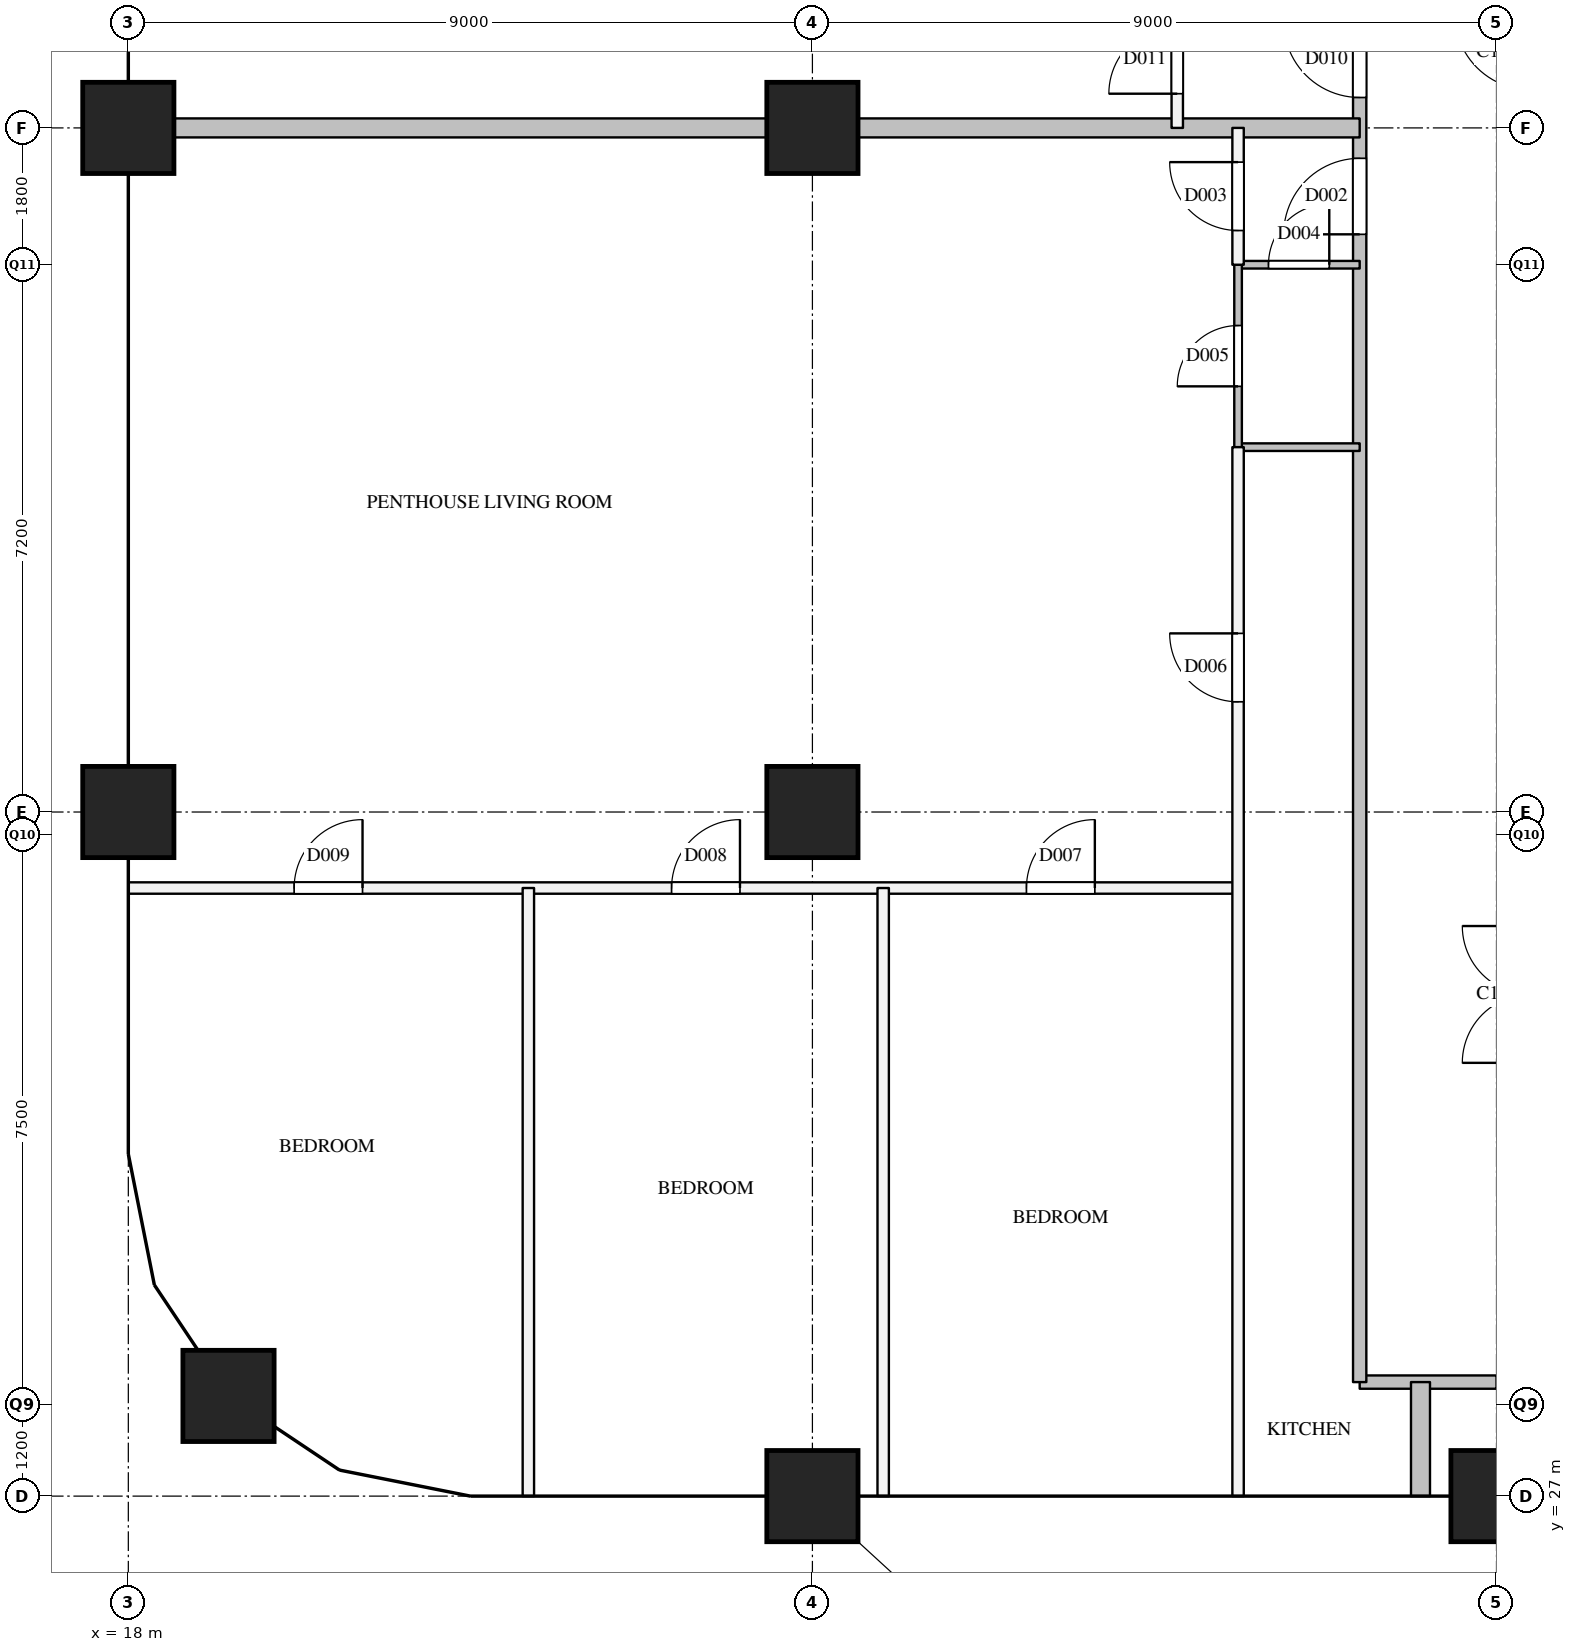
"""IFC4 building model, lengths in metres.
Left out: names, types, materials, properties, quantities, classifications, styles, units other than length and angle.
Written with IfcOpenShell. Run it as: python <this file> out.ifc"""

import sys

from ifc_helpers import new_model, si_unit, direction, frame, frame_2d, origin, origin_2d, place, context, subcontext, project, spatial, rectangle, extrude, element, fill, save


model = new_model("IFC4")
c1 = context("Model", 3, precision=1e-05, world=origin(), true_north=direction((0.0, 1.0)))
c2 = subcontext(c1, "Body", "Model", "MODEL_VIEW")
j1 = project(units=[si_unit("LENGTHUNIT", "METRE"), si_unit("PLANEANGLEUNIT", "RADIAN")], contexts=[c1])
p1 = place(None, origin())
s1 = spatial("IfcSite", under=j1, at=p1, CompositionType="ELEMENT")
p2 = place(p1, origin())
s2 = spatial("IfcBuilding", under=s1, at=p2, CompositionType="ELEMENT")
p3 = place(p2, frame((0.0, 0.0, 301.2)))
s3 = spatial("IfcBuildingStorey", under=s2, at=p3, CompositionType="ELEMENT", Elevation=301.2)
for number, where, z_axis, x_axis in (
    (1, (19.318, 28.318, 0.0), (0.0, 0.0, 1.0), (1.0, 0.0, 0.0)),
    (2, (18.0, 36.0, 0.0), (0.0, 0.0, 1.0), (1.0, 0.0, 0.0)),
    (3, (18.0, 45.0, 0.0), (0.0, 0.0, 1.0), (1.0, 0.0, 0.0)),
    (4, (27.0, 27.0, 0.0), (0.0, 0.0, 1.0), (1.0, 0.0, 0.0)),
    (5, (27.0, 36.0, 0.0), (0.0, 0.0, 1.0), (1.0, 0.0, 0.0)),
    (6, (27.0, 45.0, 0.0), (0.0, 0.0, 1.0), (1.0, 0.0, 0.0)),
    (7, (36.0, 27.0, 0.0), (0.0, 0.0, 1.0), (1.0, 0.0, 0.0)),
):
    element("IfcColumn", number, at=place(p3, frame(where, z_axis=z_axis, x_axis=x_axis)), inside=s3, PredefinedType="COLUMN", context=c2, shape_type="SweptSolid", body=[
        extrude(rectangle(XDim=1.2, YDim=1.2, at=origin_2d()), origin(), (0.0, 0.0, 1.0), 3.9),
    ])
p4 = place(p3, frame((34.2, 28.5, 0.0), z_axis=(0.0, 0.0, 1.0), x_axis=(1.0, 0.0, 0.0)))
e8 = element("IfcWall", 8, at=p4, inside=s3, PredefinedType="PARTITIONING", context=c2, shape_type="SweptSolid", body=[
    extrude(rectangle(XDim=1.8, YDim=0.175, at=frame_2d((0.9, 0.0))), origin(), (0.0, 0.0, 1.0), 3.6),
])
p5 = place(p3, frame((34.2, 28.5, 0.0), z_axis=(0.0, 0.0, 1.0), x_axis=(0.0, 1.0, 0.0)))
e9 = element("IfcWall", 9, at=p5, inside=s3, PredefinedType="PARTITIONING", context=c2, shape_type="SweptSolid", body=[
    extrude(rectangle(XDim=23.3, YDim=0.175, at=frame_2d((11.65, 0.0))), origin(), (0.0, 0.0, 1.0), 3.6),
])
p6 = place(p5, frame((15.1, 0.0, 0.0)))
e10 = element("IfcOpeningElement", 10, at=p6, cuts=e9, PredefinedType="OPENING", context=c2, shape_type="SweptSolid", body=[
    extrude(rectangle(XDim=1.0, YDim=2.1, at=frame_2d((0.5, 1.05))), frame((0.0, 0.097, 0.0), z_axis=(0.0, -1.0, 0.0), x_axis=(1.0, 0.0, 0.0)), (0.0, 0.0, 1.0), 0.195),
])
p7 = place(p5, frame((16.9, 0.0, 0.0)))
e11 = element("IfcOpeningElement", 11, at=p7, cuts=e9, PredefinedType="OPENING", context=c2, shape_type="SweptSolid", body=[
    extrude(rectangle(XDim=1.0, YDim=2.1, at=frame_2d((0.5, 1.05))), frame((0.0, 0.097, 0.0), z_axis=(0.0, -1.0, 0.0), x_axis=(1.0, 0.0, 0.0)), (0.0, 0.0, 1.0), 0.195),
])
p8 = place(p5, frame((21.9, 0.0, 0.0)))
e12 = element("IfcOpeningElement", 12, at=p8, cuts=e9, PredefinedType="OPENING", context=c2, shape_type="SweptSolid", body=[
    extrude(rectangle(XDim=1.0, YDim=2.1, at=frame_2d((0.5, 1.05))), frame((0.0, 0.097, 0.0), z_axis=(0.0, -1.0, 0.0), x_axis=(1.0, 0.0, 0.0)), (0.0, 0.0, 1.0), 0.195),
])
p9 = place(p3, frame((18.0, 35.0, 0.0), z_axis=(0.0, 0.0, 1.0), x_axis=(1.0, 0.0, 0.0)))
e13 = element("IfcWall", 13, at=p9, inside=s3, PredefinedType="PARTITIONING", context=c2, shape_type="SweptSolid", body=[
    extrude(rectangle(XDim=14.6, YDim=0.15, at=frame_2d((7.3, 0.0))), origin(), (0.0, 0.0, 1.0), 2.6),
])
p10 = place(p9, frame((11.816, 0.0, 0.0)))
e14 = element("IfcOpeningElement", 14, at=p10, cuts=e13, PredefinedType="OPENING", context=c2, shape_type="SweptSolid", body=[
    extrude(rectangle(XDim=0.9, YDim=2.1, at=frame_2d((0.45, 1.05))), frame((0.0, 0.085, 0.0), z_axis=(0.0, -1.0, 0.0), x_axis=(1.0, 0.0, 0.0)), (0.0, 0.0, 1.0), 0.17),
])
p11 = place(p9, frame((7.147, 0.0, 0.0)))
e15 = element("IfcOpeningElement", 15, at=p11, cuts=e13, PredefinedType="OPENING", context=c2, shape_type="SweptSolid", body=[
    extrude(rectangle(XDim=0.9, YDim=2.1, at=frame_2d((0.45, 1.05))), frame((0.0, 0.085, 0.0), z_axis=(0.0, -1.0, 0.0), x_axis=(1.0, 0.0, 0.0)), (0.0, 0.0, 1.0), 0.17),
])
p12 = place(p9, frame((2.181, 0.0, 0.0)))
e16 = element("IfcOpeningElement", 16, at=p12, cuts=e13, PredefinedType="OPENING", context=c2, shape_type="SweptSolid", body=[
    extrude(rectangle(XDim=0.9, YDim=2.1, at=frame_2d((0.45, 1.05))), frame((0.0, 0.085, 0.0), z_axis=(0.0, -1.0, 0.0), x_axis=(1.0, 0.0, 0.0)), (0.0, 0.0, 1.0), 0.17),
])
for number, where, z_axis, x_axis in (
    (17, (23.263, 27.0, 0.0), (0.0, 0.0, 1.0), (0.0, 1.0, 0.0)),
    (18, (27.931, 27.0, 0.0), (0.0, 0.0, 1.0), (0.0, 1.0, 0.0)),
):
    element("IfcWall", number, at=place(p3, frame(where, z_axis=z_axis, x_axis=x_axis)), inside=s3, PredefinedType="PARTITIONING", context=c2, shape_type="SweptSolid", body=[
        extrude(rectangle(XDim=8.0, YDim=0.15, at=frame_2d((4.0, 0.0))), origin(), (0.0, 0.0, 1.0), 2.6),
    ])
p13 = place(p3, frame((31.8, 45.0, 0.0), z_axis=(0.0, 0.0, 1.0), x_axis=(0.0, 1.0, 0.0)))
e19 = element("IfcWall", 19, at=p13, inside=s3, PredefinedType="PARTITIONING", context=c2, shape_type="SweptSolid", body=[
    extrude(rectangle(XDim=1.8, YDim=0.15, at=frame_2d((0.9, 0.0))), origin(), (0.0, 0.0, 1.0), 3.6),
])
p14 = place(p13, frame((0.45, 0.0, 0.0)))
e20 = element("IfcOpeningElement", 20, at=p14, cuts=e19, PredefinedType="OPENING", context=c2, shape_type="SweptSolid", body=[
    extrude(rectangle(XDim=0.9, YDim=2.1, at=frame_2d((0.45, 1.05))), frame((0.0, 0.085, 0.0), z_axis=(0.0, -1.0, 0.0), x_axis=(1.0, 0.0, 0.0)), (0.0, 0.0, 1.0), 0.17),
])
p15 = place(p3, frame((32.6, 27.0, 0.0), z_axis=(0.0, 0.0, 1.0), x_axis=(0.0, 1.0, 0.0)))
e21 = element("IfcWall", 21, at=p15, inside=s3, PredefinedType="PARTITIONING", context=c2, shape_type="SweptSolid", body=[
    extrude(rectangle(XDim=13.8, YDim=0.15, at=frame_2d((6.9, 0.0))), origin(), (0.0, 0.0, 1.0), 2.6),
])
p16 = place(p15, frame((10.45, 0.0, 0.0)))
e22 = element("IfcOpeningElement", 22, at=p16, cuts=e21, PredefinedType="OPENING", context=c2, shape_type="SweptSolid", body=[
    extrude(rectangle(XDim=0.9, YDim=2.1, at=frame_2d((0.45, 1.05))), frame((0.0, 0.085, 0.0), z_axis=(0.0, -1.0, 0.0), x_axis=(1.0, 0.0, 0.0)), (0.0, 0.0, 1.0), 0.17),
])
p17 = place(p3, frame((32.6, 43.2, 0.0), z_axis=(0.0, 0.0, 1.0), x_axis=(0.0, 1.0, 0.0)))
e23 = element("IfcWall", 23, at=p17, inside=s3, PredefinedType="PARTITIONING", context=c2, shape_type="SweptSolid", body=[
    extrude(rectangle(XDim=1.8, YDim=0.15, at=frame_2d((0.9, 0.0))), origin(), (0.0, 0.0, 1.0), 3.6),
])
p18 = place(p17, frame((0.45, 0.0, 0.0)))
e24 = element("IfcOpeningElement", 24, at=p18, cuts=e23, PredefinedType="OPENING", context=c2, shape_type="SweptSolid", body=[
    extrude(rectangle(XDim=0.9, YDim=2.1, at=frame_2d((0.45, 1.05))), frame((0.0, 0.085, 0.0), z_axis=(0.0, -1.0, 0.0), x_axis=(1.0, 0.0, 0.0)), (0.0, 0.0, 1.0), 0.17),
])
p19 = place(p3, frame((18.0, 45.0, 0.0), z_axis=(0.0, 0.0, 1.0), x_axis=(1.0, 0.0, 0.0)))
e25 = element("IfcWall", 25, at=p19, inside=s3, PredefinedType="PARTITIONING", context=c2, shape_type="SweptSolid", body=[
    extrude(rectangle(XDim=16.2, YDim=0.25, at=frame_2d((8.1, 0.0))), origin(), (0.0, 0.0, 1.0), 3.6),
])
p20 = place(p3, frame((35.0, 27.0, 0.0), z_axis=(0.0, 0.0, 1.0), x_axis=(0.0, 1.0, 0.0)))
e26 = element("IfcWall", 26, at=p20, inside=s3, PredefinedType="PARTITIONING", context=c2, shape_type="SweptSolid", body=[
    extrude(rectangle(XDim=1.5, YDim=0.25, at=frame_2d((0.75, 0.0))), origin(), (0.0, 0.0, 1.0), 2.6),
])
p21 = place(p3, frame((32.6, 40.8, 0.0), z_axis=(0.0, 0.0, 1.0), x_axis=(1.0, 0.0, 0.0)))
e27 = element("IfcWall", 27, at=p21, inside=s3, PredefinedType="PARTITIONING", context=c2, shape_type="SweptSolid", body=[
    extrude(rectangle(XDim=1.6, YDim=0.1, at=frame_2d((0.8, 0.0))), origin(), (0.0, 0.0, 1.0), 3.6),
])
p22 = place(p3, frame((32.6, 43.2, 0.0), z_axis=(0.0, 0.0, 1.0), x_axis=(1.0, 0.0, 0.0)))
e28 = element("IfcWall", 28, at=p22, inside=s3, PredefinedType="PARTITIONING", context=c2, shape_type="SweptSolid", body=[
    extrude(rectangle(XDim=1.6, YDim=0.1, at=frame_2d((0.8, 0.0))), origin(), (0.0, 0.0, 1.0), 3.6),
])
p23 = place(p22, frame((0.4, 0.0, 0.0)))
e29 = element("IfcOpeningElement", 29, at=p23, cuts=e28, PredefinedType="OPENING", context=c2, shape_type="SweptSolid", body=[
    extrude(rectangle(XDim=0.8, YDim=2.1, at=frame_2d((0.4, 1.05))), frame((0.0, 0.06, 0.0), z_axis=(0.0, -1.0, 0.0), x_axis=(1.0, 0.0, 0.0)), (0.0, 0.0, 1.0), 0.12),
])
p24 = place(p3, frame((32.6, 40.8, 0.0), z_axis=(0.0, 0.0, 1.0), x_axis=(0.0, 1.0, 0.0)))
e30 = element("IfcWall", 30, at=p24, inside=s3, PredefinedType="PARTITIONING", context=c2, shape_type="SweptSolid", body=[
    extrude(rectangle(XDim=2.4, YDim=0.1, at=frame_2d((1.2, 0.0))), origin(), (0.0, 0.0, 1.0), 3.6),
])
p25 = place(p24, frame((0.8, 0.0, 0.0)))
e31 = element("IfcOpeningElement", 31, at=p25, cuts=e30, PredefinedType="OPENING", context=c2, shape_type="SweptSolid", body=[
    extrude(rectangle(XDim=0.8, YDim=2.1, at=frame_2d((0.4, 1.05))), frame((0.0, 0.06, 0.0), z_axis=(0.0, -1.0, 0.0), x_axis=(1.0, 0.0, 0.0)), (0.0, 0.0, 1.0), 0.12),
])
p26 = place(p6, origin())
e32 = element("IfcDoor", 32, at=p26, inside=s3, OperationType="SINGLE_SWING_LEFT", PredefinedType="DOOR", context=c2, shape_type="SweptSolid", body=[
    extrude(rectangle(XDim=1.0, YDim=2.1, at=frame_2d((0.5, 1.05))), frame((0.0, 0.025, 0.0), z_axis=(0.0, -1.0, 0.0), x_axis=(1.0, 0.0, 0.0)), (0.0, 0.0, 1.0), 0.05),
])
fill(e10, e32)
p27 = place(p18, origin())
e33 = element("IfcDoor", 33, at=p27, inside=s3, OperationType="SINGLE_SWING_RIGHT", PredefinedType="DOOR", context=c2, shape_type="SweptSolid", body=[
    extrude(rectangle(XDim=0.9, YDim=2.1, at=frame_2d((0.45, 1.05))), frame((0.0, 0.025, 0.0), z_axis=(0.0, -1.0, 0.0), x_axis=(1.0, 0.0, 0.0)), (0.0, 0.0, 1.0), 0.05),
])
fill(e24, e33)
p28 = place(p23, origin())
e34 = element("IfcDoor", 34, at=p28, inside=s3, OperationType="SINGLE_SWING_RIGHT", PredefinedType="DOOR", context=c2, shape_type="SweptSolid", body=[
    extrude(rectangle(XDim=0.8, YDim=2.1, at=frame_2d((0.4, 1.05))), frame((0.0, 0.025, 0.0), z_axis=(0.0, -1.0, 0.0), x_axis=(1.0, 0.0, 0.0)), (0.0, 0.0, 1.0), 0.05),
])
fill(e29, e34)
p29 = place(p25, origin())
e35 = element("IfcDoor", 35, at=p29, inside=s3, OperationType="SINGLE_SWING_LEFT", PredefinedType="DOOR", context=c2, shape_type="SweptSolid", body=[
    extrude(rectangle(XDim=0.8, YDim=2.1, at=frame_2d((0.4, 1.05))), frame((0.0, 0.025, 0.0), z_axis=(0.0, -1.0, 0.0), x_axis=(1.0, 0.0, 0.0)), (0.0, 0.0, 1.0), 0.05),
])
fill(e31, e35)
p30 = place(p16, origin())
e36 = element("IfcDoor", 36, at=p30, inside=s3, OperationType="SINGLE_SWING_RIGHT", PredefinedType="DOOR", context=c2, shape_type="SweptSolid", body=[
    extrude(rectangle(XDim=0.9, YDim=2.1, at=frame_2d((0.45, 1.05))), frame((0.0, 0.025, 0.0), z_axis=(0.0, -1.0, 0.0), x_axis=(1.0, 0.0, 0.0)), (0.0, 0.0, 1.0), 0.05),
])
fill(e22, e36)
p31 = place(p10, origin())
e37 = element("IfcDoor", 37, at=p31, inside=s3, OperationType="SINGLE_SWING_RIGHT", PredefinedType="DOOR", context=c2, shape_type="SweptSolid", body=[
    extrude(rectangle(XDim=0.9, YDim=2.1, at=frame_2d((0.45, 1.05))), frame((0.0, 0.025, 0.0), z_axis=(0.0, -1.0, 0.0), x_axis=(1.0, 0.0, 0.0)), (0.0, 0.0, 1.0), 0.05),
])
fill(e14, e37)
p32 = place(p11, origin())
e38 = element("IfcDoor", 38, at=p32, inside=s3, OperationType="SINGLE_SWING_RIGHT", PredefinedType="DOOR", context=c2, shape_type="SweptSolid", body=[
    extrude(rectangle(XDim=0.9, YDim=2.1, at=frame_2d((0.45, 1.05))), frame((0.0, 0.025, 0.0), z_axis=(0.0, -1.0, 0.0), x_axis=(1.0, 0.0, 0.0)), (0.0, 0.0, 1.0), 0.05),
])
fill(e15, e38)
p33 = place(p12, origin())
e39 = element("IfcDoor", 39, at=p33, inside=s3, OperationType="SINGLE_SWING_RIGHT", PredefinedType="DOOR", context=c2, shape_type="SweptSolid", body=[
    extrude(rectangle(XDim=0.9, YDim=2.1, at=frame_2d((0.45, 1.05))), frame((0.0, 0.025, 0.0), z_axis=(0.0, -1.0, 0.0), x_axis=(1.0, 0.0, 0.0)), (0.0, 0.0, 1.0), 0.05),
])
fill(e16, e39)
p34 = place(p7, origin())
e40 = element("IfcDoor", 40, at=p34, inside=s3, OperationType="SINGLE_SWING_RIGHT", PredefinedType="DOOR", context=c2, shape_type="SweptSolid", body=[
    extrude(rectangle(XDim=1.0, YDim=2.1, at=frame_2d((0.5, 1.05))), frame((0.0, 0.025, 0.0), z_axis=(0.0, -1.0, 0.0), x_axis=(1.0, 0.0, 0.0)), (0.0, 0.0, 1.0), 0.05),
])
fill(e11, e40)
p35 = place(p14, origin())
e41 = element("IfcDoor", 41, at=p35, inside=s3, OperationType="SINGLE_SWING_LEFT", PredefinedType="DOOR", context=c2, shape_type="SweptSolid", body=[
    extrude(rectangle(XDim=0.9, YDim=2.1, at=frame_2d((0.45, 1.05))), frame((0.0, 0.025, 0.0), z_axis=(0.0, -1.0, 0.0), x_axis=(1.0, 0.0, 0.0)), (0.0, 0.0, 1.0), 0.05),
])
fill(e20, e41)
save(model, sys.argv[1])
